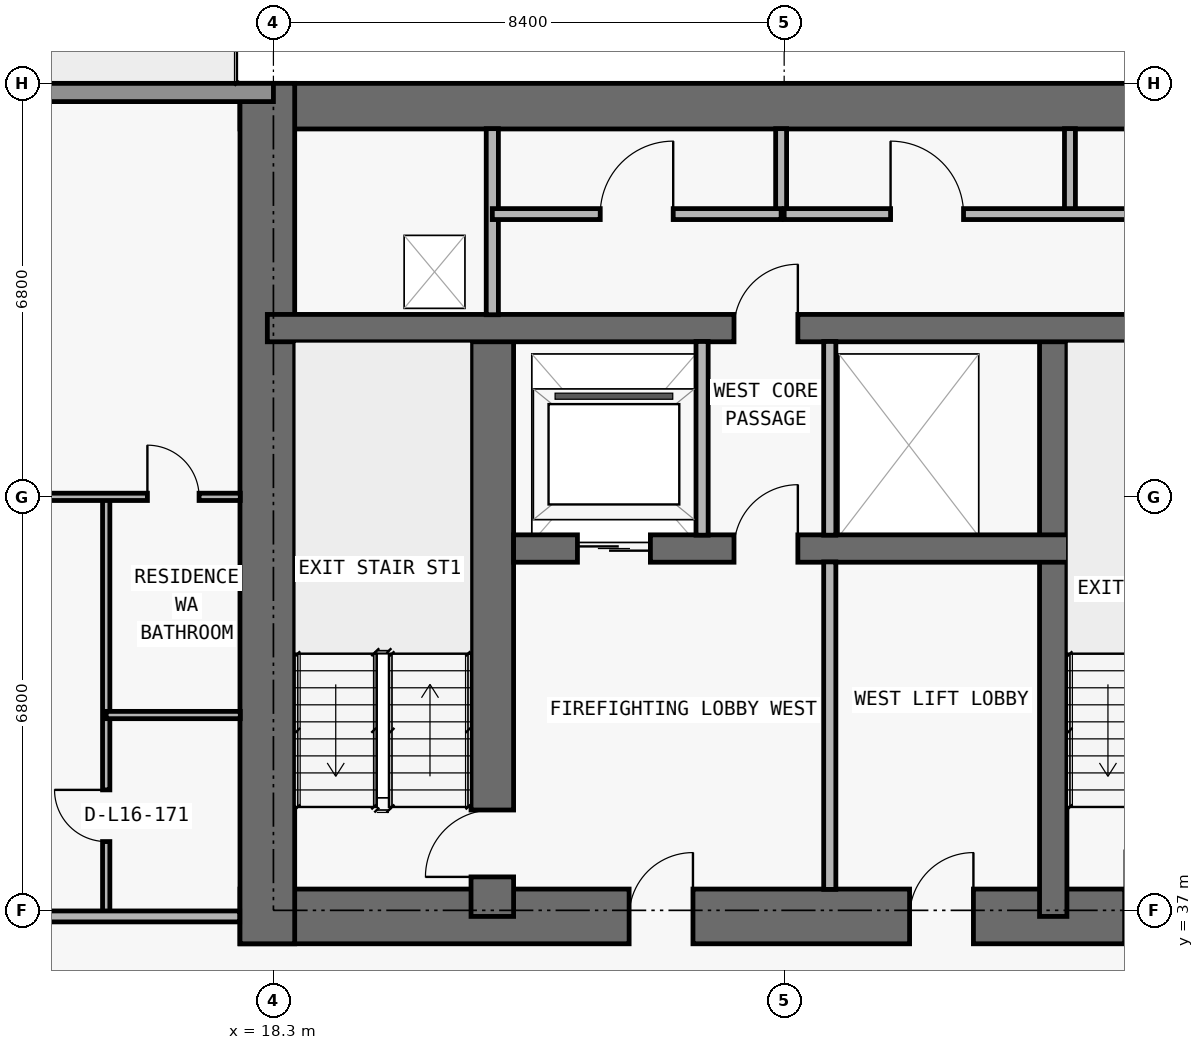
"""IFC4 building model, lengths in metres.
Left out: names, types, materials, properties, quantities, classifications, styles, units other than length and angle.
Written with IfcOpenShell. Run it as: python <this file> out.ifc"""

import sys

from ifc_helpers import new_model, si_unit, direction, frame, frame_2d, origin, place, context, subcontext, project, spatial, rectangle, extrude, element, fill, save


model = new_model("IFC4")
c1 = context("Model", 3, precision=1e-05, world=origin(), true_north=direction((0.0, 1.0)))
c2 = subcontext(c1, "Body", "Model", "MODEL_VIEW")
j1 = project(units=[si_unit("LENGTHUNIT", "METRE"), si_unit("PLANEANGLEUNIT", "RADIAN")], contexts=[c1])
p1 = place(None, origin())
s1 = spatial("IfcSite", under=j1, at=p1, CompositionType="ELEMENT")
p2 = place(p1, origin())
s2 = spatial("IfcBuilding", under=s1, at=p2, CompositionType="ELEMENT")
p3 = place(p2, frame((0.0, 0.0, 63.0)))
s3 = spatial("IfcBuildingStorey", under=s2, at=p3, CompositionType="ELEMENT", Elevation=63.0)
p4 = place(p3, frame((17.75, 36.9, 0.0), z_axis=(0.0, 0.0, 1.0), x_axis=(1.0, 0.0, 0.0)))
e1 = element("IfcWall", 1, at=p4, inside=s3, PredefinedType="SHEAR", context=c2, shape_type="SweptSolid", body=[
    extrude(rectangle(XDim=42.3, YDim=0.9, at=frame_2d((21.15, 0.0))), origin(), (0.0, 0.0, 1.0), 3.05),
])
p5 = place(p4, frame((14.55, 0.0, 0.0)))
e2 = element("IfcOpeningElement", 2, at=p5, cuts=e1, PredefinedType="OPENING", context=c2, shape_type="SweptSolid", body=[
    extrude(rectangle(XDim=1.1, YDim=2.15, at=frame_2d((0.55, 1.075))), frame((0.0, 0.46, 0.0), z_axis=(0.0, -1.0, 0.0), x_axis=(1.0, 0.0, 0.0)), (0.0, 0.0, 1.0), 0.92),
])
p6 = place(p4, frame((6.4, 0.0, 0.0)))
e3 = element("IfcOpeningElement", 3, at=p6, cuts=e1, PredefinedType="OPENING", context=c2, shape_type="SweptSolid", body=[
    extrude(rectangle(XDim=1.05, YDim=2.15, at=frame_2d((0.525, 1.075))), frame((0.0, 0.46, 0.0), z_axis=(0.0, -1.0, 0.0), x_axis=(1.0, 0.0, 0.0)), (0.0, 0.0, 1.0), 0.92),
])
p7 = place(p4, frame((34.9, 0.0, 0.0)))
e4 = element("IfcOpeningElement", 4, at=p7, cuts=e1, PredefinedType="OPENING", context=c2, shape_type="SweptSolid", body=[
    extrude(rectangle(XDim=1.05, YDim=2.15, at=frame_2d((0.525, 1.075))), frame((0.0, 0.46, 0.0), z_axis=(0.0, -1.0, 0.0), x_axis=(1.0, 0.0, 0.0)), (0.0, 0.0, 1.0), 0.92),
])
p8 = place(p4, frame((11.012, 0.0, 0.0)))
e5 = element("IfcOpeningElement", 5, at=p8, cuts=e1, PredefinedType="OPENING", context=c2, shape_type="SweptSolid", body=[
    extrude(rectangle(XDim=1.05, YDim=2.15, at=frame_2d((0.525, 1.075))), frame((0.0, 0.46, 0.0), z_axis=(0.0, -1.0, 0.0), x_axis=(1.0, 0.0, 0.0)), (0.0, 0.0, 1.0), 0.92),
])
p9 = place(p4, frame((24.25, 0.0, 0.0)))
e6 = element("IfcOpeningElement", 6, at=p9, cuts=e1, PredefinedType="OPENING", context=c2, shape_type="SweptSolid", body=[
    extrude(rectangle(XDim=1.05, YDim=2.15, at=frame_2d((0.525, 1.075))), frame((0.0, 0.46, 0.0), z_axis=(0.0, -1.0, 0.0), x_axis=(1.0, 0.0, 0.0)), (0.0, 0.0, 1.0), 0.92),
])
p10 = place(p3, frame((17.75, 50.225, 0.0), z_axis=(0.0, 0.0, 1.0), x_axis=(1.0, 0.0, 0.0)))
e7 = element("IfcWall", 7, at=p10, inside=s3, PredefinedType="SHEAR", context=c2, shape_type="SweptSolid", body=[
    extrude(rectangle(XDim=42.3, YDim=0.75, at=frame_2d((21.15, 0.0))), origin(), (0.0, 0.0, 1.0), 3.05),
])
p11 = place(p3, frame((18.2, 36.45, 0.0), z_axis=(0.0, 0.0, 1.0), x_axis=(0.0, 1.0, 0.0)))
e8 = element("IfcWall", 8, at=p11, inside=s3, PredefinedType="SHEAR", context=c2, shape_type="SweptSolid", body=[
    extrude(rectangle(XDim=14.15, YDim=0.9, at=frame_2d((7.075, 0.0))), origin(), (0.0, 0.0, 1.0), 3.05),
])
p12 = place(p3, frame((21.9, 36.9, 0.0), z_axis=(0.0, 0.0, 1.0), x_axis=(0.0, 1.0, 0.0)))
e9 = element("IfcWall", 9, at=p12, inside=s3, PredefinedType="SHEAR", context=c2, shape_type="SweptSolid", body=[
    extrude(rectangle(XDim=9.675, YDim=0.7, at=frame_2d((4.837, 0.0))), origin(), (0.0, 0.0, 1.0), 3.05),
])
p13 = place(p12, frame((0.65, 0.0, 0.0)))
e10 = element("IfcOpeningElement", 10, at=p13, cuts=e9, PredefinedType="OPENING", context=c2, shape_type="SweptSolid", body=[
    extrude(rectangle(XDim=1.1, YDim=2.15, at=frame_2d((0.55, 1.075))), frame((0.0, 0.36, 0.0), z_axis=(0.0, -1.0, 0.0), x_axis=(1.0, 0.0, 0.0)), (0.0, 0.0, 1.0), 0.72),
])
p14 = place(p3, frame((31.125, 36.9, 0.0), z_axis=(0.0, 0.0, 1.0), x_axis=(0.0, 1.0, 0.0)))
e11 = element("IfcWall", 11, at=p14, inside=s3, PredefinedType="SHEAR", context=c2, shape_type="SweptSolid", body=[
    extrude(rectangle(XDim=9.675, YDim=0.45, at=frame_2d((4.837, 0.0))), origin(), (0.0, 0.0, 1.0), 3.05),
])
p15 = place(p3, frame((22.25, 42.95, 0.0), z_axis=(0.0, 0.0, 1.0), x_axis=(1.0, 0.0, 0.0)))
e12 = element("IfcWall", 12, at=p15, inside=s3, PredefinedType="SHEAR", context=c2, shape_type="SweptSolid", body=[
    extrude(rectangle(XDim=33.3, YDim=0.45, at=frame_2d((16.65, 0.0))), origin(), (0.0, 0.0, 1.0), 3.05),
])
p16 = place(p15, frame((1.05, 0.0, 0.0)))
e13 = element("IfcOpeningElement", 13, at=p16, cuts=e12, PredefinedType="OPENING", context=c2, shape_type="SweptSolid", body=[
    extrude(rectangle(XDim=1.2, YDim=2.2, at=frame_2d((0.6, 1.1))), frame((0.0, 0.235, 0.0), z_axis=(0.0, -1.0, 0.0), x_axis=(1.0, 0.0, 0.0)), (0.0, 0.0, 1.0), 0.47),
])
p17 = place(p15, frame((31.05, 0.0, 0.0)))
e14 = element("IfcOpeningElement", 14, at=p17, cuts=e12, PredefinedType="OPENING", context=c2, shape_type="SweptSolid", body=[
    extrude(rectangle(XDim=1.2, YDim=2.2, at=frame_2d((0.6, 1.1))), frame((0.0, 0.235, 0.0), z_axis=(0.0, -1.0, 0.0), x_axis=(1.0, 0.0, 0.0)), (0.0, 0.0, 1.0), 0.47),
])
p18 = place(p15, frame((13.5, 0.0, 0.0)))
e15 = element("IfcOpeningElement", 15, at=p18, cuts=e12, PredefinedType="OPENING", context=c2, shape_type="SweptSolid", body=[
    extrude(rectangle(XDim=1.1, YDim=2.2, at=frame_2d((0.55, 1.1))), frame((0.0, 0.235, 0.0), z_axis=(0.0, -1.0, 0.0), x_axis=(1.0, 0.0, 0.0)), (0.0, 0.0, 1.0), 0.47),
])
p19 = place(p15, frame((16.1, 0.0, 0.0)))
e16 = element("IfcOpeningElement", 16, at=p19, cuts=e12, PredefinedType="OPENING", context=c2, shape_type="SweptSolid", body=[
    extrude(rectangle(XDim=1.1, YDim=2.2, at=frame_2d((0.55, 1.1))), frame((0.0, 0.235, 0.0), z_axis=(0.0, -1.0, 0.0), x_axis=(1.0, 0.0, 0.0)), (0.0, 0.0, 1.0), 0.47),
])
p20 = place(p15, frame((18.7, 0.0, 0.0)))
e17 = element("IfcOpeningElement", 17, at=p20, cuts=e12, PredefinedType="OPENING", context=c2, shape_type="SweptSolid", body=[
    extrude(rectangle(XDim=1.1, YDim=2.2, at=frame_2d((0.55, 1.1))), frame((0.0, 0.235, 0.0), z_axis=(0.0, -1.0, 0.0), x_axis=(1.0, 0.0, 0.0)), (0.0, 0.0, 1.0), 0.47),
])
p21 = place(p15, frame((3.625, 0.0, 0.0)))
e18 = element("IfcOpeningElement", 18, at=p21, cuts=e12, PredefinedType="OPENING", context=c2, shape_type="SweptSolid", body=[
    extrude(rectangle(XDim=1.05, YDim=2.15, at=frame_2d((0.525, 1.075))), frame((0.0, 0.235, 0.0), z_axis=(0.0, -1.0, 0.0), x_axis=(1.0, 0.0, 0.0)), (0.0, 0.0, 1.0), 0.47),
])
p22 = place(p15, frame((28.675, 0.0, 0.0)))
e19 = element("IfcOpeningElement", 19, at=p22, cuts=e12, PredefinedType="OPENING", context=c2, shape_type="SweptSolid", body=[
    extrude(rectangle(XDim=1.05, YDim=2.15, at=frame_2d((0.525, 1.075))), frame((0.0, 0.235, 0.0), z_axis=(0.0, -1.0, 0.0), x_axis=(1.0, 0.0, 0.0)), (0.0, 0.0, 1.0), 0.47),
])
p23 = place(p3, frame((18.2, 46.575, 0.0), z_axis=(0.0, 0.0, 1.0), x_axis=(1.0, 0.0, 0.0)))
e20 = element("IfcWall", 20, at=p23, inside=s3, PredefinedType="SHEAR", context=c2, shape_type="SweptSolid", body=[
    extrude(rectangle(XDim=41.4, YDim=0.45, at=frame_2d((20.7, 0.0))), origin(), (0.0, 0.0, 1.0), 3.05),
])
p24 = place(p23, frame((7.675, 0.0, 0.0)))
e21 = element("IfcOpeningElement", 21, at=p24, cuts=e20, PredefinedType="OPENING", context=c2, shape_type="SweptSolid", body=[
    extrude(rectangle(XDim=1.05, YDim=2.15, at=frame_2d((0.525, 1.075))), frame((0.0, 0.235, 0.0), z_axis=(0.0, -1.0, 0.0), x_axis=(1.0, 0.0, 0.0)), (0.0, 0.0, 1.0), 0.47),
])
p25 = place(p23, frame((32.725, 0.0, 0.0)))
e22 = element("IfcOpeningElement", 22, at=p25, cuts=e20, PredefinedType="OPENING", context=c2, shape_type="SweptSolid", body=[
    extrude(rectangle(XDim=1.05, YDim=2.15, at=frame_2d((0.525, 1.075))), frame((0.0, 0.235, 0.0), z_axis=(0.0, -1.0, 0.0), x_axis=(1.0, 0.0, 0.0)), (0.0, 0.0, 1.0), 0.47),
])
p26 = place(p3, frame((5.1, 50.45, 0.0), z_axis=(0.0, 0.0, 1.0), x_axis=(1.0, 0.0, 0.0)))
e23 = element("IfcWall", 23, at=p26, inside=s3, PredefinedType="STANDARD", context=c2, shape_type="SweptSolid", body=[
    extrude(rectangle(XDim=13.2, YDim=0.3, at=frame_2d((6.6, 0.0))), origin(), (0.0, 0.0, 1.0), 3.05),
])
p27 = place(p26, frame((5.6, 0.0, 0.0)))
e24 = element("IfcOpeningElement", 24, at=p27, cuts=e23, PredefinedType="OPENING", context=c2, shape_type="SweptSolid", body=[
    extrude(rectangle(XDim=2.0, YDim=2.3, at=frame_2d((1.0, 1.15))), frame((0.0, 0.16, 0.0), z_axis=(0.0, -1.0, 0.0), x_axis=(1.0, 0.0, 0.0)), (0.0, 0.0, 1.0), 0.32),
])
p28 = place(p3, frame((15.55, 36.9, 0.0), z_axis=(0.0, 0.0, 1.0), x_axis=(0.0, 1.0, 0.0)))
e25 = element("IfcWall", 25, at=p28, inside=s3, PredefinedType="PARTITIONING", context=c2, shape_type="SweptSolid", body=[
    extrude(rectangle(XDim=6.9, YDim=0.12, at=frame_2d((3.45, 0.0))), origin(), (0.0, 0.0, 1.0), 2.499),
])
p29 = place(p28, frame((1.231, 0.0, 0.0)))
e26 = element("IfcOpeningElement", 26, at=p29, cuts=e25, PredefinedType="OPENING", context=c2, shape_type="SweptSolid", body=[
    extrude(rectangle(XDim=0.85, YDim=2.1, at=frame_2d((0.425, 1.05))), frame((0.0, 0.07, 0.0), z_axis=(0.0, -1.0, 0.0), x_axis=(1.0, 0.0, 0.0)), (0.0, 0.0, 1.0), 0.14),
])
p30 = place(p3, frame((21.9, 46.795, 0.0), z_axis=(0.0, 0.0, 1.0), x_axis=(0.0, 1.0, 0.0)))
e27 = element("IfcWall", 27, at=p30, inside=s3, PredefinedType="PARTITIONING", context=c2, shape_type="SweptSolid", body=[
    extrude(rectangle(XDim=3.06, YDim=0.2, at=frame_2d((1.53, 0.0))), origin(), (0.0, 0.0, 1.0), 3.05),
])
p31 = place(p3, frame((25.35, 43.17, 0.0), z_axis=(0.0, 0.0, 1.0), x_axis=(0.0, 1.0, 0.0)))
e28 = element("IfcWall", 28, at=p31, inside=s3, PredefinedType="PARTITIONING", context=c2, shape_type="SweptSolid", body=[
    extrude(rectangle(XDim=3.185, YDim=0.2, at=frame_2d((1.593, 0.0))), origin(), (0.0, 0.0, 1.0), 3.05),
])
p32 = place(p3, frame((26.65, 48.45, 0.0), z_axis=(0.0, 0.0, 1.0), x_axis=(0.0, 1.0, 0.0)))
e29 = element("IfcWall", 29, at=p32, inside=s3, PredefinedType="PARTITIONING", context=c2, shape_type="SweptSolid", body=[
    extrude(rectangle(XDim=1.405, YDim=0.18, at=frame_2d((0.703, 0.0))), origin(), (0.0, 0.0, 1.0), 3.05),
])
p33 = place(p3, frame((27.45, 37.345, 0.0), z_axis=(0.0, 0.0, 1.0), x_axis=(0.0, 1.0, 0.0)))
e30 = element("IfcWall", 30, at=p33, inside=s3, PredefinedType="PARTITIONING", context=c2, shape_type="SweptSolid", body=[
    extrude(rectangle(XDim=5.385, YDim=0.2, at=frame_2d((2.692, 0.0))), origin(), (0.0, 0.0, 1.0), 3.05),
])
p34 = place(p3, frame((27.45, 43.17, 0.0), z_axis=(0.0, 0.0, 1.0), x_axis=(0.0, 1.0, 0.0)))
e31 = element("IfcWall", 31, at=p34, inside=s3, PredefinedType="PARTITIONING", context=c2, shape_type="SweptSolid", body=[
    extrude(rectangle(XDim=3.185, YDim=0.2, at=frame_2d((1.593, 0.0))), origin(), (0.0, 0.0, 1.0), 3.05),
])
p35 = place(p3, frame((31.4, 48.45, 0.0), z_axis=(0.0, 0.0, 1.0), x_axis=(0.0, 1.0, 0.0)))
e32 = element("IfcWall", 32, at=p35, inside=s3, PredefinedType="PARTITIONING", context=c2, shape_type="SweptSolid", body=[
    extrude(rectangle(XDim=1.405, YDim=0.18, at=frame_2d((0.703, 0.0))), origin(), (0.0, 0.0, 1.0), 3.05),
])
p36 = place(p3, frame((5.1, 36.9, 0.0), z_axis=(0.0, 0.0, 1.0), x_axis=(1.0, 0.0, 0.0)))
e33 = element("IfcWall", 33, at=p36, inside=s3, PredefinedType="PARTITIONING", context=c2, shape_type="SweptSolid", body=[
    extrude(rectangle(XDim=12.645, YDim=0.18, at=frame_2d((6.323, 0.0))), origin(), (0.0, 0.0, 1.0), 3.05),
])
p37 = place(p36, frame((7.125, 0.0, 0.0)))
e34 = element("IfcOpeningElement", 34, at=p37, cuts=e33, PredefinedType="OPENING", context=c2, shape_type="SweptSolid", body=[
    extrude(rectangle(XDim=1.0, YDim=2.2, at=frame_2d((0.5, 1.1))), frame((0.0, 0.1, 0.0), z_axis=(0.0, -1.0, 0.0), x_axis=(1.0, 0.0, 0.0)), (0.0, 0.0, 1.0), 0.2),
])
p38 = place(p3, frame((15.55, 40.212, 0.0), z_axis=(0.0, 0.0, 1.0), x_axis=(1.0, 0.0, 0.0)))
e35 = element("IfcWall", 35, at=p38, inside=s3, PredefinedType="PARTITIONING", context=c2, shape_type="SweptSolid", body=[
    extrude(rectangle(XDim=2.205, YDim=0.12, at=frame_2d((1.103, 0.0))), origin(), (0.0, 0.0, 1.0), 3.05),
])
p39 = place(p3, frame((1.795, 43.8, 0.0), z_axis=(0.0, 0.0, 1.0), x_axis=(1.0, 0.0, 0.0)))
e36 = element("IfcWall", 36, at=p39, inside=s3, PredefinedType="PARTITIONING", context=c2, shape_type="SweptSolid", body=[
    extrude(rectangle(XDim=15.96, YDim=0.12, at=frame_2d((7.98, 0.0))), origin(), (0.0, 0.0, 1.0), 2.339),
])
p40 = place(p39, frame((5.255, 0.0, 0.0)))
e37 = element("IfcOpeningElement", 37, at=p40, cuts=e36, PredefinedType="OPENING", context=c2, shape_type="SweptSolid", body=[
    extrude(rectangle(XDim=0.9, YDim=2.15, at=frame_2d((0.45, 1.075))), frame((0.0, 0.07, 0.0), z_axis=(0.0, -1.0, 0.0), x_axis=(1.0, 0.0, 0.0)), (0.0, 0.0, 1.0), 0.14),
])
p41 = place(p39, frame((10.48, 0.0, 0.0)))
e38 = element("IfcOpeningElement", 38, at=p41, cuts=e36, PredefinedType="OPENING", context=c2, shape_type="SweptSolid", body=[
    extrude(rectangle(XDim=0.9, YDim=2.15, at=frame_2d((0.45, 1.075))), frame((0.0, 0.07, 0.0), z_axis=(0.0, -1.0, 0.0), x_axis=(1.0, 0.0, 0.0)), (0.0, 0.0, 1.0), 0.14),
])
p42 = place(p39, frame((14.433, 0.0, 0.0)))
e39 = element("IfcOpeningElement", 39, at=p42, cuts=e36, PredefinedType="OPENING", context=c2, shape_type="SweptSolid", body=[
    extrude(rectangle(XDim=0.85, YDim=2.1, at=frame_2d((0.425, 1.05))), frame((0.0, 0.07, 0.0), z_axis=(0.0, -1.0, 0.0), x_axis=(1.0, 0.0, 0.0)), (0.0, 0.0, 1.0), 0.14),
])
p43 = place(p3, frame((21.9, 48.45, 0.0), z_axis=(0.0, 0.0, 1.0), x_axis=(1.0, 0.0, 0.0)))
e40 = element("IfcWall", 40, at=p43, inside=s3, PredefinedType="PARTITIONING", context=c2, shape_type="SweptSolid", body=[
    extrude(rectangle(XDim=4.75, YDim=0.18, at=frame_2d((2.375, 0.0))), origin(), (0.0, 0.0, 1.0), 3.05),
])
p44 = place(p43, frame((1.775, 0.0, 0.0)))
e41 = element("IfcOpeningElement", 41, at=p44, cuts=e40, PredefinedType="OPENING", context=c2, shape_type="SweptSolid", body=[
    extrude(rectangle(XDim=1.2, YDim=2.2, at=frame_2d((0.6, 1.1))), frame((0.0, 0.1, 0.0), z_axis=(0.0, -1.0, 0.0), x_axis=(1.0, 0.0, 0.0)), (0.0, 0.0, 1.0), 0.2),
])
p45 = place(p3, frame((26.7, 48.45, 0.0), z_axis=(0.0, 0.0, 1.0), x_axis=(1.0, 0.0, 0.0)))
e42 = element("IfcWall", 42, at=p45, inside=s3, PredefinedType="PARTITIONING", context=c2, shape_type="SweptSolid", body=[
    extrude(rectangle(XDim=29.2, YDim=0.18, at=frame_2d((14.6, 0.0))), origin(), (0.0, 0.0, 1.0), 3.05),
])
p46 = place(p45, frame((1.75, 0.0, 0.0)))
e43 = element("IfcOpeningElement", 43, at=p46, cuts=e42, PredefinedType="OPENING", context=c2, shape_type="SweptSolid", body=[
    extrude(rectangle(XDim=1.2, YDim=2.2, at=frame_2d((0.6, 1.1))), frame((0.0, 0.1, 0.0), z_axis=(0.0, -1.0, 0.0), x_axis=(1.0, 0.0, 0.0)), (0.0, 0.0, 1.0), 0.2),
])
p47 = place(p45, frame((6.475, 0.0, 0.0)))
e44 = element("IfcOpeningElement", 44, at=p47, cuts=e42, PredefinedType="OPENING", context=c2, shape_type="SweptSolid", body=[
    extrude(rectangle(XDim=1.2, YDim=2.2, at=frame_2d((0.6, 1.1))), frame((0.0, 0.1, 0.0), z_axis=(0.0, -1.0, 0.0), x_axis=(1.0, 0.0, 0.0)), (0.0, 0.0, 1.0), 0.2),
])
p48 = place(p45, frame((14.05, 0.0, 0.0)))
e45 = element("IfcOpeningElement", 45, at=p48, cuts=e42, PredefinedType="OPENING", context=c2, shape_type="SweptSolid", body=[
    extrude(rectangle(XDim=1.0, YDim=2.2, at=frame_2d((0.5, 1.1))), frame((0.0, 0.1, 0.0), z_axis=(0.0, -1.0, 0.0), x_axis=(1.0, 0.0, 0.0)), (0.0, 0.0, 1.0), 0.2),
])
p49 = place(p45, frame((21.425, 0.0, 0.0)))
e46 = element("IfcOpeningElement", 46, at=p49, cuts=e42, PredefinedType="OPENING", context=c2, shape_type="SweptSolid", body=[
    extrude(rectangle(XDim=1.2, YDim=2.2, at=frame_2d((0.6, 1.1))), frame((0.0, 0.1, 0.0), z_axis=(0.0, -1.0, 0.0), x_axis=(1.0, 0.0, 0.0)), (0.0, 0.0, 1.0), 0.2),
])
p50 = place(p45, frame((26.375, 0.0, 0.0)))
e47 = element("IfcOpeningElement", 47, at=p50, cuts=e42, PredefinedType="OPENING", context=c2, shape_type="SweptSolid", body=[
    extrude(rectangle(XDim=0.85, YDim=2.1, at=frame_2d((0.425, 1.05))), frame((0.0, 0.1, 0.0), z_axis=(0.0, -1.0, 0.0), x_axis=(1.0, 0.0, 0.0)), (0.0, 0.0, 1.0), 0.2),
])
p51 = place(p16, origin())
e48 = element("IfcDoor", 48, at=p51, inside=s3, OperationType="DOUBLE_DOOR_SLIDING", PredefinedType="DOOR", context=c2, shape_type="SweptSolid", body=[
    extrude(rectangle(XDim=1.2, YDim=2.2, at=frame_2d((0.6, 1.1))), frame((0.0, 0.025, 0.0), z_axis=(0.0, -1.0, 0.0), x_axis=(1.0, 0.0, 0.0)), (0.0, 0.0, 1.0), 0.05),
])
fill(e13, e48)
p52 = place(p6, origin())
e49 = element("IfcDoor", 49, at=p52, inside=s3, OperationType="SINGLE_SWING_RIGHT", PredefinedType="DOOR", context=c2, shape_type="SweptSolid", body=[
    extrude(rectangle(XDim=1.05, YDim=2.15, at=frame_2d((0.525, 1.075))), frame((0.0, 0.025, 0.0), z_axis=(0.0, -1.0, 0.0), x_axis=(1.0, 0.0, 0.0)), (0.0, 0.0, 1.0), 0.05),
])
fill(e3, e49)
p53 = place(p13, origin())
e50 = element("IfcDoor", 50, at=p53, inside=s3, OperationType="SINGLE_SWING_LEFT", PredefinedType="DOOR", context=c2, shape_type="SweptSolid", body=[
    extrude(rectangle(XDim=1.1, YDim=2.15, at=frame_2d((0.55, 1.075))), frame((0.0, 0.025, 0.0), z_axis=(0.0, -1.0, 0.0), x_axis=(1.0, 0.0, 0.0)), (0.0, 0.0, 1.0), 0.05),
])
fill(e10, e50)
p54 = place(p21, origin())
e51 = element("IfcDoor", 51, at=p54, inside=s3, OperationType="SINGLE_SWING_RIGHT", PredefinedType="DOOR", context=c2, shape_type="SweptSolid", body=[
    extrude(rectangle(XDim=1.05, YDim=2.15, at=frame_2d((0.525, 1.075))), frame((0.0, 0.025, 0.0), z_axis=(0.0, -1.0, 0.0), x_axis=(1.0, 0.0, 0.0)), (0.0, 0.0, 1.0), 0.05),
])
fill(e18, e51)
p55 = place(p8, origin())
e52 = element("IfcDoor", 52, at=p55, inside=s3, OperationType="SINGLE_SWING_RIGHT", PredefinedType="DOOR", context=c2, shape_type="SweptSolid", body=[
    extrude(rectangle(XDim=1.05, YDim=2.15, at=frame_2d((0.525, 1.075))), frame((0.0, 0.025, 0.0), z_axis=(0.0, -1.0, 0.0), x_axis=(1.0, 0.0, 0.0)), (0.0, 0.0, 1.0), 0.05),
])
fill(e5, e52)
p56 = place(p24, origin())
e53 = element("IfcDoor", 53, at=p56, inside=s3, OperationType="SINGLE_SWING_RIGHT", PredefinedType="DOOR", context=c2, shape_type="SweptSolid", body=[
    extrude(rectangle(XDim=1.05, YDim=2.15, at=frame_2d((0.525, 1.075))), frame((0.0, 0.025, 0.0), z_axis=(0.0, -1.0, 0.0), x_axis=(1.0, 0.0, 0.0)), (0.0, 0.0, 1.0), 0.05),
])
fill(e21, e53)
p57 = place(p44, origin())
e54 = element("IfcDoor", 54, at=p57, inside=s3, OperationType="SINGLE_SWING_RIGHT", PredefinedType="DOOR", context=c2, shape_type="SweptSolid", body=[
    extrude(rectangle(XDim=1.2, YDim=2.2, at=frame_2d((0.6, 1.1))), frame((0.0, 0.025, 0.0), z_axis=(0.0, -1.0, 0.0), x_axis=(1.0, 0.0, 0.0)), (0.0, 0.0, 1.0), 0.05),
])
fill(e41, e54)
p58 = place(p46, origin())
e55 = element("IfcDoor", 55, at=p58, inside=s3, OperationType="SINGLE_SWING_LEFT", PredefinedType="DOOR", context=c2, shape_type="SweptSolid", body=[
    extrude(rectangle(XDim=1.2, YDim=2.2, at=frame_2d((0.6, 1.1))), frame((0.0, 0.025, 0.0), z_axis=(0.0, -1.0, 0.0), x_axis=(1.0, 0.0, 0.0)), (0.0, 0.0, 1.0), 0.05),
])
fill(e43, e55)
p59 = place(p29, origin())
e56 = element("IfcDoor", 56, at=p59, inside=s3, OperationType="SINGLE_SWING_RIGHT", PredefinedType="DOOR", context=c2, shape_type="SweptSolid", body=[
    extrude(rectangle(XDim=0.85, YDim=2.1, at=frame_2d((0.425, 1.05))), frame((0.0, 0.025, 0.0), z_axis=(0.0, -1.0, 0.0), x_axis=(1.0, 0.0, 0.0)), (0.0, 0.0, 1.0), 0.05),
])
fill(e26, e56)
p60 = place(p42, origin())
e57 = element("IfcDoor", 57, at=p60, inside=s3, OperationType="SINGLE_SWING_LEFT", PredefinedType="DOOR", context=c2, shape_type="SweptSolid", body=[
    extrude(rectangle(XDim=0.85, YDim=2.1, at=frame_2d((0.425, 1.05))), frame((0.0, 0.025, 0.0), z_axis=(0.0, -1.0, 0.0), x_axis=(1.0, 0.0, 0.0)), (0.0, 0.0, 1.0), 0.05),
])
fill(e39, e57)
save(model, sys.argv[1])
